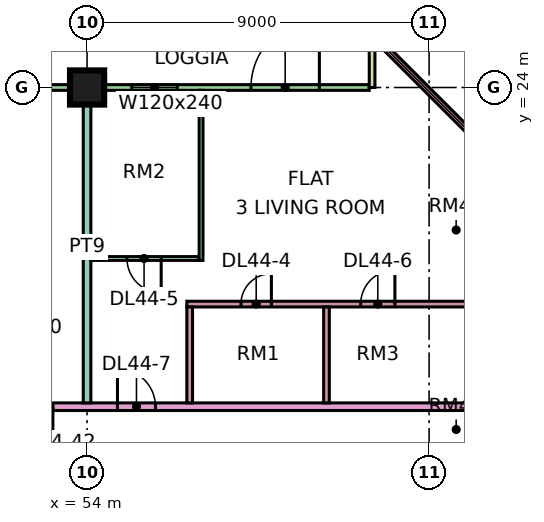
"""IFC4 building model, lengths in metres.
Left out: names, types, materials, properties, quantities, classifications, styles, units other than length and angle.
Written with IfcOpenShell. Run it as: python <this file> out.ifc"""

import sys

from ifc_helpers import new_model, si_unit, direction, frame, frame_2d, origin, origin_2d, place, context, subcontext, project, spatial, rectangle, extrude, element, fill, save


model = new_model("IFC4")
c1 = context("Model", 3, precision=1e-05, world=origin(), true_north=direction((0.0, 1.0)))
c2 = subcontext(c1, "Body", "Model", "MODEL_VIEW")
j1 = project(units=[si_unit("LENGTHUNIT", "METRE"), si_unit("PLANEANGLEUNIT", "RADIAN")], contexts=[c1])
p1 = place(None, origin())
s1 = spatial("IfcSite", under=j1, at=p1, CompositionType="ELEMENT")
p2 = place(p1, origin())
s2 = spatial("IfcBuilding", under=s1, at=p2, CompositionType="ELEMENT")
p3 = place(p2, frame((0.0, 0.0, 191.15)))
s3 = spatial("IfcBuildingStorey", under=s2, at=p3, CompositionType="ELEMENT", Elevation=191.15)
p4 = place(p3, frame((54.0, 24.0, 0.0), z_axis=(0.0, 0.0, 1.0), x_axis=(1.0, 0.0, 0.0)))
e1 = element("IfcColumn", 1, at=p4, inside=s3, PredefinedType="COLUMN", context=c2, shape_type="SweptSolid", body=[
    extrude(rectangle(XDim=0.9, YDim=0.9, at=origin_2d()), origin(), (0.0, 0.0, 1.0), 3.75),
])
p5 = place(p3, frame((61.425, 24.0, 0.0), z_axis=(0.0, 0.0, 1.0), x_axis=(-1.0, 0.0, 0.0)))
e2 = element("IfcWall", 2, at=p5, inside=s3, PredefinedType="SOLIDWALL", context=c2, shape_type="SweptSolid", body=[
    extrude(rectangle(XDim=13.35, YDim=0.15, at=frame_2d((6.675, 0.0))), origin(), (0.0, 0.0, 1.0), 3.35),
])
p6 = place(p5, frame((1.312, 0.0, 0.0)))
e3 = element("IfcOpeningElement", 3, at=p6, cuts=e2, PredefinedType="OPENING", context=c2, shape_type="SweptSolid", body=[
    extrude(rectangle(XDim=1.8, YDim=2.4, at=frame_2d((0.9, 1.2))), frame((0.0, 0.085, 0.0), z_axis=(0.0, -1.0, 0.0), x_axis=(1.0, 0.0, 0.0)), (0.0, 0.0, 1.0), 0.17),
])
p7 = place(p5, frame((5.05, 0.0, 0.45)))
e4 = element("IfcOpeningElement", 4, at=p7, cuts=e2, PredefinedType="OPENING", context=c2, shape_type="SweptSolid", body=[
    extrude(rectangle(XDim=1.2, YDim=2.4, at=frame_2d((0.6, 1.2))), frame((0.0, 0.085, 0.0), z_axis=(0.0, -1.0, 0.0), x_axis=(1.0, 0.0, 0.0)), (0.0, 0.0, 1.0), 0.17),
])
p8 = place(p5, frame((8.562, 0.0, 0.45)))
e5 = element("IfcOpeningElement", 5, at=p8, cuts=e2, PredefinedType="OPENING", context=c2, shape_type="SweptSolid", body=[
    extrude(rectangle(XDim=4.2, YDim=2.4, at=frame_2d((2.1, 1.2))), frame((0.0, 0.085, 0.0), z_axis=(0.0, -1.0, 0.0), x_axis=(1.0, 0.0, 0.0)), (0.0, 0.0, 1.0), 0.17),
])
p9 = place(p3, frame((61.5, 25.5, 0.0), z_axis=(0.0, 0.0, 1.0), x_axis=(0.0, -1.0, 0.0)))
e6 = element("IfcWall", 6, at=p9, inside=s3, PredefinedType="SOLIDWALL", context=c2, shape_type="SweptSolid", body=[
    extrude(rectangle(XDim=1.5, YDim=0.15, at=frame_2d((0.75, 0.0))), origin(), (0.0, 0.0, 1.0), 3.35),
])
p10 = place(p3, frame((64.447, 22.447, 0.0), z_axis=(0.0, 0.0, 1.0), x_axis=(-0.707106781187, 0.707106781187, 0.0)))
e7 = element("IfcWall", 7, at=p10, inside=s3, PredefinedType="SOLIDWALL", context=c2, shape_type="SweptSolid", body=[
    extrude(rectangle(XDim=4.243, YDim=0.15, at=frame_2d((2.121, 0.0))), origin(), (0.0, 0.0, 1.0), 3.35),
])
p11 = place(p10, frame((0.621, 0.0, 0.45)))
e8 = element("IfcOpeningElement", 8, at=p11, cuts=e7, PredefinedType="OPENING", context=c2, shape_type="SweptSolid", body=[
    extrude(rectangle(XDim=3.0, YDim=2.4, at=frame_2d((1.5, 1.2))), frame((0.0, 0.085, 0.0), z_axis=(0.0, -1.0, 0.0), x_axis=(1.0, 0.0, 0.0)), (0.0, 0.0, 1.0), 0.17),
])
p12 = place(p3, frame((51.225, 15.6, 0.0), z_axis=(0.0, 0.0, 1.0), x_axis=(1.0, 0.0, 0.0)))
e9 = element("IfcWall", 9, at=p12, inside=s3, PredefinedType="PARTITIONING", context=c2, shape_type="SweptSolid", body=[
    extrude(rectangle(XDim=13.125, YDim=0.2, at=frame_2d((6.562, 0.0))), origin(), (0.0, 0.0, 1.0), 3.35),
])
p13 = place(p12, frame((3.575, 0.0, 0.0)))
e10 = element("IfcOpeningElement", 10, at=p13, cuts=e9, PredefinedType="OPENING", context=c2, shape_type="SweptSolid", body=[
    extrude(rectangle(XDim=1.0, YDim=2.1, at=frame_2d((0.5, 1.05))), frame((0.0, 0.11, 0.0), z_axis=(0.0, -1.0, 0.0), x_axis=(1.0, 0.0, 0.0)), (0.0, 0.0, 1.0), 0.22),
])
p14 = place(p12, frame((0.875, 0.0, 0.0)))
e11 = element("IfcOpeningElement", 11, at=p14, cuts=e9, PredefinedType="OPENING", context=c2, shape_type="SweptSolid", body=[
    extrude(rectangle(XDim=1.0, YDim=2.1, at=frame_2d((0.5, 1.05))), frame((0.0, 0.11, 0.0), z_axis=(0.0, -1.0, 0.0), x_axis=(1.0, 0.0, 0.0)), (0.0, 0.0, 1.0), 0.22),
])
p15 = place(p3, frame((54.0, 15.7, 0.0), z_axis=(0.0, 0.0, 1.0), x_axis=(0.0, 1.0, 0.0)))
e12 = element("IfcWall", 12, at=p15, inside=s3, PredefinedType="PARTITIONING", context=c2, shape_type="SweptSolid", body=[
    extrude(rectangle(XDim=8.226, YDim=0.2, at=frame_2d((4.113, 0.0))), origin(), (0.0, 0.0, 1.0), 3.35),
])
p16 = place(p3, frame((54.1, 19.5, 0.0), z_axis=(0.0, 0.0, 1.0), x_axis=(1.0, 0.0, 0.0)))
e13 = element("IfcWall", 13, at=p16, inside=s3, PredefinedType="PARTITIONING", context=c2, shape_type="SweptSolid", body=[
    extrude(rectangle(XDim=2.85, YDim=0.1, at=frame_2d((1.425, 0.0))), origin(), (0.0, 0.0, 1.0), 3.35),
])
p17 = place(p16, frame((0.95, 0.0, 0.0)))
e14 = element("IfcOpeningElement", 14, at=p17, cuts=e13, PredefinedType="OPENING", context=c2, shape_type="SweptSolid", body=[
    extrude(rectangle(XDim=0.9, YDim=2.1, at=frame_2d((0.45, 1.05))), frame((0.0, 0.06, 0.0), z_axis=(0.0, -1.0, 0.0), x_axis=(1.0, 0.0, 0.0)), (0.0, 0.0, 1.0), 0.12),
])
p18 = place(p3, frame((56.625, 18.3, 0.0), z_axis=(0.0, 0.0, 1.0), x_axis=(1.0, 0.0, 0.0)))
e15 = element("IfcWall", 15, at=p18, inside=s3, PredefinedType="PARTITIONING", context=c2, shape_type="SweptSolid", body=[
    extrude(rectangle(XDim=7.725, YDim=0.15, at=frame_2d((3.863, 0.0))), origin(), (0.0, 0.0, 1.0), 3.35),
])
p19 = place(p18, frame((1.425, 0.0, 0.0)))
e16 = element("IfcOpeningElement", 16, at=p19, cuts=e15, PredefinedType="OPENING", context=c2, shape_type="SweptSolid", body=[
    extrude(rectangle(XDim=0.8, YDim=2.1, at=frame_2d((0.4, 1.05))), frame((0.0, 0.085, 0.0), z_axis=(0.0, -1.0, 0.0), x_axis=(1.0, 0.0, 0.0)), (0.0, 0.0, 1.0), 0.17),
])
p20 = place(p18, frame((4.575, 0.0, 0.0)))
e17 = element("IfcOpeningElement", 17, at=p20, cuts=e15, PredefinedType="OPENING", context=c2, shape_type="SweptSolid", body=[
    extrude(rectangle(XDim=0.9, YDim=2.1, at=frame_2d((0.45, 1.05))), frame((0.0, 0.085, 0.0), z_axis=(0.0, -1.0, 0.0), x_axis=(1.0, 0.0, 0.0)), (0.0, 0.0, 1.0), 0.17),
])
p21 = place(p3, frame((56.7, 15.7, 0.0), z_axis=(0.0, 0.0, 1.0), x_axis=(0.0, 1.0, 0.0)))
e18 = element("IfcWall", 18, at=p21, inside=s3, PredefinedType="PARTITIONING", context=c2, shape_type="SweptSolid", body=[
    extrude(rectangle(XDim=2.525, YDim=0.15, at=frame_2d((1.263, 0.0))), origin(), (0.0, 0.0, 1.0), 3.35),
])
p22 = place(p3, frame((57.0, 19.45, 0.0), z_axis=(0.0, 0.0, 1.0), x_axis=(0.0, 1.0, 0.0)))
e19 = element("IfcWall", 19, at=p22, inside=s3, PredefinedType="PARTITIONING", context=c2, shape_type="SweptSolid", body=[
    extrude(rectangle(XDim=4.476, YDim=0.1, at=frame_2d((2.238, 0.0))), origin(), (0.0, 0.0, 1.0), 3.35),
])
p23 = place(p3, frame((60.3, 15.7, 0.0), z_axis=(0.0, 0.0, 1.0), x_axis=(0.0, 1.0, 0.0)))
e20 = element("IfcWall", 20, at=p23, inside=s3, PredefinedType="PARTITIONING", context=c2, shape_type="SweptSolid", body=[
    extrude(rectangle(XDim=2.525, YDim=0.15, at=frame_2d((1.263, 0.0))), origin(), (0.0, 0.0, 1.0), 3.35),
])
p24 = place(p6, frame((1.8, 0.0, 0.0), z_axis=(0.0, 0.0, 1.0), x_axis=(-1.0, 0.0, 0.0)))
e21 = element("IfcDoor", 21, at=p24, inside=s3, OperationType="DOUBLE_DOOR_SINGLE_SWING", PredefinedType="DOOR", context=c2, shape_type="SweptSolid", body=[
    extrude(rectangle(XDim=1.8, YDim=2.4, at=frame_2d((0.9, 1.2))), frame((0.0, 0.025, 0.0), z_axis=(0.0, -1.0, 0.0), x_axis=(1.0, 0.0, 0.0)), (0.0, 0.0, 1.0), 0.05),
])
fill(e3, e21)
p25 = place(p7, origin())
e22 = element("IfcWindow", 22, at=p25, inside=s3, PartitioningType="SINGLE_PANEL", PredefinedType="WINDOW", context=c2, shape_type="SweptSolid", body=[
    extrude(rectangle(XDim=1.2, YDim=2.4, at=frame_2d((0.6, 1.2))), frame((0.0, 0.03, 0.0), z_axis=(0.0, -1.0, 0.0), x_axis=(1.0, 0.0, 0.0)), (0.0, 0.0, 1.0), 0.06),
])
fill(e4, e22)
p26 = place(p11, origin())
e23 = element("IfcWindow", 23, at=p26, inside=s3, PartitioningType="SINGLE_PANEL", PredefinedType="WINDOW", context=c2, shape_type="SweptSolid", body=[
    extrude(rectangle(XDim=3.0, YDim=2.4, at=frame_2d((1.5, 1.2))), frame((0.0, 0.03, 0.0), z_axis=(0.0, -1.0, 0.0), x_axis=(1.0, 0.0, 0.0)), (0.0, 0.0, 1.0), 0.06),
])
fill(e8, e23)
p27 = place(p19, frame((0.8, 0.0, 0.0), z_axis=(0.0, 0.0, 1.0), x_axis=(-1.0, 0.0, 0.0)))
e24 = element("IfcDoor", 24, at=p27, inside=s3, OperationType="SINGLE_SWING_RIGHT", PredefinedType="DOOR", context=c2, shape_type="SweptSolid", body=[
    extrude(rectangle(XDim=0.8, YDim=2.1, at=frame_2d((0.4, 1.05))), frame((0.0, 0.025, 0.0), z_axis=(0.0, -1.0, 0.0), x_axis=(1.0, 0.0, 0.0)), (0.0, 0.0, 1.0), 0.05),
])
fill(e16, e24)
p28 = place(p17, origin())
e25 = element("IfcDoor", 25, at=p28, inside=s3, OperationType="SINGLE_SWING_RIGHT", PredefinedType="DOOR", context=c2, shape_type="SweptSolid", body=[
    extrude(rectangle(XDim=0.9, YDim=2.1, at=frame_2d((0.45, 1.05))), frame((0.0, 0.025, 0.0), z_axis=(0.0, -1.0, 0.0), x_axis=(1.0, 0.0, 0.0)), (0.0, 0.0, 1.0), 0.05),
])
fill(e14, e25)
p29 = place(p20, frame((0.9, 0.0, 0.0), z_axis=(0.0, 0.0, 1.0), x_axis=(-1.0, 0.0, 0.0)))
e26 = element("IfcDoor", 26, at=p29, inside=s3, OperationType="SINGLE_SWING_RIGHT", PredefinedType="DOOR", context=c2, shape_type="SweptSolid", body=[
    extrude(rectangle(XDim=0.9, YDim=2.1, at=frame_2d((0.45, 1.05))), frame((0.0, 0.025, 0.0), z_axis=(0.0, -1.0, 0.0), x_axis=(1.0, 0.0, 0.0)), (0.0, 0.0, 1.0), 0.05),
])
fill(e17, e26)
p30 = place(p13, origin())
e27 = element("IfcDoor", 27, at=p30, inside=s3, OperationType="SINGLE_SWING_LEFT", PredefinedType="DOOR", context=c2, shape_type="SweptSolid", body=[
    extrude(rectangle(XDim=1.0, YDim=2.1, at=frame_2d((0.5, 1.05))), frame((0.0, 0.025, 0.0), z_axis=(0.0, -1.0, 0.0), x_axis=(1.0, 0.0, 0.0)), (0.0, 0.0, 1.0), 0.05),
])
fill(e10, e27)
p31 = place(p14, origin())
e28 = element("IfcDoor", 28, at=p31, inside=s3, OperationType="SINGLE_SWING_RIGHT", PredefinedType="DOOR", context=c2, shape_type="SweptSolid", body=[
    extrude(rectangle(XDim=1.0, YDim=2.1, at=frame_2d((0.5, 1.05))), frame((0.0, 0.025, 0.0), z_axis=(0.0, -1.0, 0.0), x_axis=(1.0, 0.0, 0.0)), (0.0, 0.0, 1.0), 0.05),
])
fill(e11, e28)
save(model, sys.argv[1])
